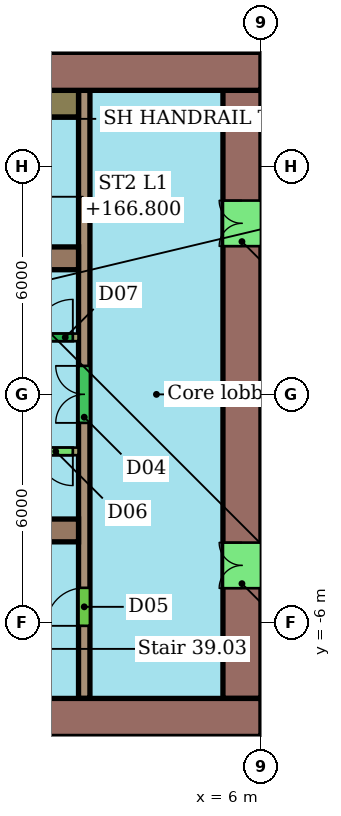
"""IFC4 building model, lengths in metres.
Left out: names, types, materials, properties, quantities, classifications, styles, units other than length and angle.
Written with IfcOpenShell. Run it as: python <this file> out.ifc"""

import sys

from ifc_helpers import new_model, si_unit, direction, frame, frame_2d, origin, place, context, subcontext, project, spatial, rectangle, extrude, element, fill, save


model = new_model("IFC4")
c1 = context("Model", 3, precision=1e-05, world=origin(), true_north=direction((0.0, 1.0)))
c2 = subcontext(c1, "Body", "Model", "MODEL_VIEW")
j1 = project(units=[si_unit("LENGTHUNIT", "METRE"), si_unit("PLANEANGLEUNIT", "RADIAN")], contexts=[c1])
p1 = place(None, origin())
s1 = spatial("IfcSite", under=j1, at=p1, CompositionType="ELEMENT")
p2 = place(p1, origin())
s2 = spatial("IfcBuilding", under=s1, at=p2, CompositionType="ELEMENT")
p3 = place(p2, frame((0.0, 0.0, 165.0)))
s3 = spatial("IfcBuildingStorey", under=s2, at=p3, CompositionType="ELEMENT", Elevation=165.0)
p4 = place(p3, frame((6.0, 8.5, 0.0), z_axis=(0.0, 0.0, 1.0), x_axis=(-1.0, 0.0, 0.0)))
e1 = element("IfcWall", 1, at=p4, inside=s3, PredefinedType="SHEAR", context=c2, shape_type="SweptSolid", body=[
    extrude(rectangle(XDim=12.0, YDim=1.0, at=frame_2d((6.0, 0.0))), origin(), (0.0, 0.0, 1.0), 3.3),
])
p5 = place(p4, frame((5.6, 0.0, 0.0)))
e2 = element("IfcOpeningElement", 2, at=p5, cuts=e1, PredefinedType="OPENING", context=c2, shape_type="SweptSolid", body=[
    extrude(rectangle(XDim=1.2, YDim=2.1, at=frame_2d((0.6, 1.05))), frame((0.0, 0.51, 0.0), z_axis=(0.0, -1.0, 0.0), x_axis=(1.0, 0.0, 0.0)), (0.0, 0.0, 1.0), 1.02),
])
p6 = place(p3, frame((-18.0, -8.5, 0.0), z_axis=(0.0, 0.0, 1.0), x_axis=(1.0, 0.0, 0.0)))
e3 = element("IfcWall", 3, at=p6, inside=s3, PredefinedType="SHEAR", context=c2, shape_type="SweptSolid", body=[
    extrude(rectangle(XDim=24.0, YDim=1.0, at=frame_2d((12.0, 0.0))), origin(), (0.0, 0.0, 1.0), 3.3),
])
p7 = place(p6, frame((6.0, 0.0, 0.0)))
e4 = element("IfcOpeningElement", 4, at=p7, cuts=e3, PredefinedType="OPENING", context=c2, shape_type="SweptSolid", body=[
    extrude(rectangle(XDim=1.2, YDim=2.1, at=frame_2d((0.6, 1.05))), frame((0.0, 0.51, 0.0), z_axis=(0.0, -1.0, 0.0), x_axis=(1.0, 0.0, 0.0)), (0.0, 0.0, 1.0), 1.02),
])
p8 = place(p3, frame((5.5, -8.0, 0.0), z_axis=(0.0, 0.0, 1.0), x_axis=(0.0, 1.0, 0.0)))
e5 = element("IfcWall", 5, at=p8, inside=s3, PredefinedType="SHEAR", context=c2, shape_type="SweptSolid", body=[
    extrude(rectangle(XDim=16.0, YDim=1.0, at=frame_2d((8.0, 0.0))), origin(), (0.0, 0.0, 1.0), 3.3),
])
p9 = place(p8, frame((2.9, 0.0, 0.0)))
e6 = element("IfcOpeningElement", 6, at=p9, cuts=e5, PredefinedType="OPENING", context=c2, shape_type="SweptSolid", body=[
    extrude(rectangle(XDim=1.2, YDim=2.1, at=frame_2d((0.6, 1.05))), frame((0.0, 0.51, 0.0), z_axis=(0.0, -1.0, 0.0), x_axis=(1.0, 0.0, 0.0)), (0.0, 0.0, 1.0), 1.02),
])
p10 = place(p8, frame((11.9, 0.0, 0.0)))
e7 = element("IfcOpeningElement", 7, at=p10, cuts=e5, PredefinedType="OPENING", context=c2, shape_type="SweptSolid", body=[
    extrude(rectangle(XDim=1.2, YDim=2.1, at=frame_2d((0.6, 1.05))), frame((0.0, 0.51, 0.0), z_axis=(0.0, -1.0, 0.0), x_axis=(1.0, 0.0, 0.0)), (0.0, 0.0, 1.0), 1.02),
])
for number, where, z_axis, x_axis in (
    (8, (-6.0, 3.58, 0.0), (0.0, 0.0, 1.0), (1.0, 0.0, 0.0)),
    (9, (-6.0, -3.58, 0.0), (0.0, 0.0, 1.0), (1.0, 0.0, 0.0)),
):
    element("IfcWall", number, at=place(p3, frame(where, z_axis=z_axis, x_axis=x_axis)), inside=s3, PredefinedType="SHEAR", context=c2, shape_type="SweptSolid", body=[
        extrude(rectangle(XDim=7.2, YDim=0.6, at=frame_2d((3.6, 0.0))), origin(), (0.0, 0.0, 1.0), 3.3),
    ])
p11 = place(p3, frame((1.35, -8.0, 0.0), z_axis=(0.0, 0.0, 1.0), x_axis=(0.0, 1.0, 0.0)))
e10 = element("IfcWall", 10, at=p11, inside=s3, PredefinedType="SHEAR", context=c2, shape_type="SweptSolid", body=[
    extrude(rectangle(XDim=16.0, YDim=0.3, at=frame_2d((8.0, 0.0))), origin(), (0.0, 0.0, 1.0), 3.3),
])
p12 = place(p11, frame((1.91, 0.0, 0.0)))
e11 = element("IfcOpeningElement", 11, at=p12, cuts=e10, PredefinedType="OPENING", context=c2, shape_type="SweptSolid", body=[
    extrude(rectangle(XDim=1.0, YDim=2.1, at=frame_2d((0.5, 1.05))), frame((0.0, 0.16, 0.0), z_axis=(0.0, -1.0, 0.0), x_axis=(1.0, 0.0, 0.0)), (0.0, 0.0, 1.0), 0.32),
])
p13 = place(p11, frame((7.25, 0.0, 0.0)))
e12 = element("IfcOpeningElement", 12, at=p13, cuts=e10, PredefinedType="OPENING", context=c2, shape_type="SweptSolid", body=[
    extrude(rectangle(XDim=1.5, YDim=2.1, at=frame_2d((0.75, 1.05))), frame((0.0, 0.16, 0.0), z_axis=(0.0, -1.0, 0.0), x_axis=(1.0, 0.0, 0.0)), (0.0, 0.0, 1.0), 0.32),
])
p14 = place(p3, frame((-13.2, 1.5, 0.0), z_axis=(0.0, 0.0, 1.0), x_axis=(1.0, 0.0, 0.0)))
e13 = element("IfcWall", 13, at=p14, inside=s3, PredefinedType="SHEAR", context=c2, shape_type="SweptSolid", body=[
    extrude(rectangle(XDim=14.4, YDim=0.2, at=frame_2d((7.2, 0.0))), origin(), (0.0, 0.0, 1.0), 3.3),
])
p15 = place(p14, frame((0.546, 0.0, 0.0)))
e14 = element("IfcOpeningElement", 14, at=p15, cuts=e13, PredefinedType="OPENING", context=c2, shape_type="SweptSolid", body=[
    extrude(rectangle(XDim=1.1, YDim=2.1, at=frame_2d((0.55, 1.05))), frame((0.0, 0.11, 0.0), z_axis=(0.0, -1.0, 0.0), x_axis=(1.0, 0.0, 0.0)), (0.0, 0.0, 1.0), 0.22),
])
p16 = place(p14, frame((2.988, 0.0, 0.0)))
e15 = element("IfcOpeningElement", 15, at=p16, cuts=e13, PredefinedType="OPENING", context=c2, shape_type="SweptSolid", body=[
    extrude(rectangle(XDim=1.1, YDim=2.1, at=frame_2d((0.55, 1.05))), frame((0.0, 0.11, 0.0), z_axis=(0.0, -1.0, 0.0), x_axis=(1.0, 0.0, 0.0)), (0.0, 0.0, 1.0), 0.22),
])
p17 = place(p14, frame((5.429, 0.0, 0.0)))
e16 = element("IfcOpeningElement", 16, at=p17, cuts=e13, PredefinedType="OPENING", context=c2, shape_type="SweptSolid", body=[
    extrude(rectangle(XDim=1.1, YDim=2.1, at=frame_2d((0.55, 1.05))), frame((0.0, 0.11, 0.0), z_axis=(0.0, -1.0, 0.0), x_axis=(1.0, 0.0, 0.0)), (0.0, 0.0, 1.0), 0.22),
])
p18 = place(p14, frame((7.871, 0.0, 0.0)))
e17 = element("IfcOpeningElement", 17, at=p18, cuts=e13, PredefinedType="OPENING", context=c2, shape_type="SweptSolid", body=[
    extrude(rectangle(XDim=1.1, YDim=2.1, at=frame_2d((0.55, 1.05))), frame((0.0, 0.11, 0.0), z_axis=(0.0, -1.0, 0.0), x_axis=(1.0, 0.0, 0.0)), (0.0, 0.0, 1.0), 0.22),
])
p19 = place(p14, frame((11.607, 0.0, 0.0)))
e18 = element("IfcOpeningElement", 18, at=p19, cuts=e13, PredefinedType="OPENING", context=c2, shape_type="SweptSolid", body=[
    extrude(rectangle(XDim=0.9, YDim=2.1, at=frame_2d((0.45, 1.05))), frame((0.0, 0.11, 0.0), z_axis=(0.0, -1.0, 0.0), x_axis=(1.0, 0.0, 0.0)), (0.0, 0.0, 1.0), 0.22),
])
p20 = place(p14, frame((13.25, 0.0, 0.0)))
e19 = element("IfcOpeningElement", 19, at=p20, cuts=e13, PredefinedType="OPENING", context=c2, shape_type="SweptSolid", body=[
    extrude(rectangle(XDim=1.0, YDim=2.1, at=frame_2d((0.5, 1.05))), frame((0.0, 0.11, 0.0), z_axis=(0.0, -1.0, 0.0), x_axis=(1.0, 0.0, 0.0)), (0.0, 0.0, 1.0), 0.22),
])
p21 = place(p3, frame((1.2, -1.5, 0.0), z_axis=(0.0, 0.0, 1.0), x_axis=(-1.0, 0.0, 0.0)))
e20 = element("IfcWall", 20, at=p21, inside=s3, PredefinedType="SHEAR", context=c2, shape_type="SweptSolid", body=[
    extrude(rectangle(XDim=14.4, YDim=0.2, at=frame_2d((7.2, 0.0))), origin(), (0.0, 0.0, 1.0), 3.3),
])
p22 = place(p21, frame((7.821, 0.0, 0.0)))
e21 = element("IfcOpeningElement", 21, at=p22, cuts=e20, PredefinedType="OPENING", context=c2, shape_type="SweptSolid", body=[
    extrude(rectangle(XDim=1.2, YDim=2.1, at=frame_2d((0.6, 1.05))), frame((0.0, 0.11, 0.0), z_axis=(0.0, -1.0, 0.0), x_axis=(1.0, 0.0, 0.0)), (0.0, 0.0, 1.0), 0.22),
])
p23 = place(p21, frame((0.15, 0.0, 0.0)))
e22 = element("IfcOpeningElement", 22, at=p23, cuts=e20, PredefinedType="OPENING", context=c2, shape_type="SweptSolid", body=[
    extrude(rectangle(XDim=0.9, YDim=2.1, at=frame_2d((0.45, 1.05))), frame((0.0, 0.11, 0.0), z_axis=(0.0, -1.0, 0.0), x_axis=(1.0, 0.0, 0.0)), (0.0, 0.0, 1.0), 0.22),
])
p24 = place(p3, frame((0.4, 7.65, 0.0), z_axis=(0.0, 0.0, 1.0), x_axis=(1.0, 0.0, 0.0)))
e23 = element("IfcWall", 23, at=p24, inside=s3, PredefinedType="SHEAR", context=c2, shape_type="SweptSolid", body=[
    extrude(rectangle(XDim=0.8, YDim=0.7, at=frame_2d((0.4, 0.0))), origin(), (0.0, 0.0, 1.0), 3.3),
])
p25 = place(p9, origin())
e24 = element("IfcDoor", 24, at=p25, inside=s3, OperationType="DOUBLE_DOOR_SINGLE_SWING", PredefinedType="NOTDEFINED", context=c2, shape_type="SweptSolid", body=[
    extrude(rectangle(XDim=1.2, YDim=2.1, at=frame_2d((0.6, 1.05))), frame((0.0, 0.025, 0.0), z_axis=(0.0, -1.0, 0.0), x_axis=(1.0, 0.0, 0.0)), (0.0, 0.0, 1.0), 0.05),
])
fill(e6, e24)
p26 = place(p10, origin())
e25 = element("IfcDoor", 25, at=p26, inside=s3, OperationType="DOUBLE_DOOR_SINGLE_SWING", PredefinedType="NOTDEFINED", context=c2, shape_type="SweptSolid", body=[
    extrude(rectangle(XDim=1.2, YDim=2.1, at=frame_2d((0.6, 1.05))), frame((0.0, 0.025, 0.0), z_axis=(0.0, -1.0, 0.0), x_axis=(1.0, 0.0, 0.0)), (0.0, 0.0, 1.0), 0.05),
])
fill(e7, e25)
p27 = place(p12, origin())
e26 = element("IfcDoor", 26, at=p27, inside=s3, OperationType="SINGLE_SWING_LEFT", PredefinedType="NOTDEFINED", context=c2, shape_type="SweptSolid", body=[
    extrude(rectangle(XDim=1.0, YDim=2.1, at=frame_2d((0.5, 1.05))), frame((0.0, 0.025, 0.0), z_axis=(0.0, -1.0, 0.0), x_axis=(1.0, 0.0, 0.0)), (0.0, 0.0, 1.0), 0.05),
])
fill(e11, e26)
p28 = place(p13, origin())
e27 = element("IfcDoor", 27, at=p28, inside=s3, OperationType="DOUBLE_DOOR_SINGLE_SWING", PredefinedType="NOTDEFINED", context=c2, shape_type="SweptSolid", body=[
    extrude(rectangle(XDim=1.5, YDim=2.1, at=frame_2d((0.75, 1.05))), frame((0.0, 0.025, 0.0), z_axis=(0.0, -1.0, 0.0), x_axis=(1.0, 0.0, 0.0)), (0.0, 0.0, 1.0), 0.05),
])
fill(e12, e27)
p29 = place(p20, origin())
e28 = element("IfcDoor", 28, at=p29, inside=s3, OperationType="SINGLE_SWING_RIGHT", PredefinedType="NOTDEFINED", context=c2, shape_type="SweptSolid", body=[
    extrude(rectangle(XDim=1.0, YDim=2.1, at=frame_2d((0.5, 1.05))), frame((0.0, 0.025, 0.0), z_axis=(0.0, -1.0, 0.0), x_axis=(1.0, 0.0, 0.0)), (0.0, 0.0, 1.0), 0.05),
])
fill(e19, e28)
p30 = place(p23, origin())
e29 = element("IfcDoor", 29, at=p30, inside=s3, OperationType="SINGLE_SWING_LEFT", PredefinedType="NOTDEFINED", context=c2, shape_type="SweptSolid", body=[
    extrude(rectangle(XDim=0.9, YDim=2.1, at=frame_2d((0.45, 1.05))), frame((0.0, 0.025, 0.0), z_axis=(0.0, -1.0, 0.0), x_axis=(1.0, 0.0, 0.0)), (0.0, 0.0, 1.0), 0.05),
])
fill(e22, e29)
save(model, sys.argv[1])
